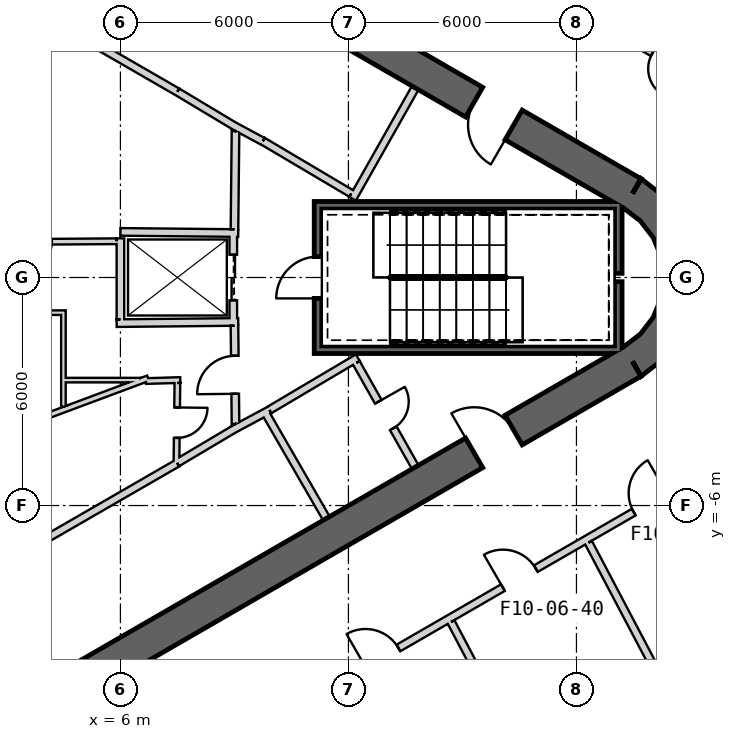
"""IFC4 building model, lengths in metres.
Left out: names, types, materials, properties, quantities, classifications, styles, units other than length and angle.
Written with IfcOpenShell. Run it as: python <this file> out.ifc"""

import sys

from ifc_helpers import new_model, si_unit, direction, frame, frame_2d, origin, place, context, subcontext, project, spatial, polyline, rectangle, outline, extrude, element, fill, save


model = new_model("IFC4")
c1 = context("Model", 3, precision=1e-05, world=origin(), true_north=direction((0.0, 1.0)))
c2 = subcontext(c1, "Body", "Model", "MODEL_VIEW")
j1 = project(units=[si_unit("LENGTHUNIT", "METRE"), si_unit("PLANEANGLEUNIT", "RADIAN")], contexts=[c1])
p1 = place(None, origin())
s1 = spatial("IfcSite", under=j1, at=p1, CompositionType="ELEMENT")
p2 = place(p1, origin())
s2 = spatial("IfcBuilding", under=s1, at=p2, CompositionType="ELEMENT")
p3 = place(p2, frame((0.0, 0.0, 39.5)))
s3 = spatial("IfcBuildingStorey", under=s2, at=p3, CompositionType="ELEMENT", Elevation=39.5)
p4 = place(p3, frame((19.475, 2.208, 0.0), z_axis=(0.0, 0.0, 1.0), x_axis=(-0.866028369851, 0.499994862586, 0.0)))
e1 = element("IfcWall", 1, at=p4, inside=s3, PredefinedType="SHEAR", context=c2, shape_type="SweptSolid", body=[
    extrude(rectangle(XDim=31.523, YDim=0.9, at=frame_2d((15.762, 0.0))), origin(), (0.0, 0.0, 1.0), 6.0),
])
p5 = place(p4, frame((3.612, 0.0, 0.0)))
e2 = element("IfcOpeningElement", 2, at=p5, cuts=e1, PredefinedType="OPENING", context=c2, shape_type="SweptSolid", body=[
    extrude(rectangle(XDim=1.2, YDim=2.4, at=frame_2d((0.6, 1.2))), frame((0.0, 0.46, 0.0), z_axis=(0.0, -1.0, 0.0), x_axis=(1.0, 0.0, 0.0)), (0.0, 0.0, 1.0), 0.92),
])
p6 = place(p4, frame((26.712, 0.0, 0.0)))
e3 = element("IfcOpeningElement", 3, at=p6, cuts=e1, PredefinedType="OPENING", context=c2, shape_type="SweptSolid", body=[
    extrude(rectangle(XDim=1.2, YDim=2.4, at=frame_2d((0.6, 1.2))), frame((0.0, 0.46, 0.0), z_axis=(0.0, -1.0, 0.0), x_axis=(1.0, 0.0, 0.0)), (0.0, 0.0, 1.0), 0.92),
])
p7 = place(p3, frame((-7.825, -17.97, 0.0), z_axis=(0.0, 0.0, 1.0), x_axis=(0.866028369851, 0.499994862586, 0.0)))
e4 = element("IfcWall", 4, at=p7, inside=s3, PredefinedType="SHEAR", context=c2, shape_type="SweptSolid", body=[
    extrude(rectangle(XDim=31.523, YDim=0.9, at=frame_2d((15.762, 0.0))), origin(), (0.0, 0.0, 1.0), 6.0),
])
p8 = place(p7, frame((26.712, 0.0, 0.0)))
e5 = element("IfcOpeningElement", 5, at=p8, cuts=e4, PredefinedType="OPENING", context=c2, shape_type="SweptSolid", body=[
    extrude(rectangle(XDim=1.2, YDim=2.4, at=frame_2d((0.6, 1.2))), frame((0.0, 0.46, 0.0), z_axis=(0.0, -1.0, 0.0), x_axis=(1.0, 0.0, 0.0)), (0.0, 0.0, 1.0), 0.92),
])
p9 = place(p7, frame((3.612, 0.0, 0.0)))
e6 = element("IfcOpeningElement", 6, at=p9, cuts=e4, PredefinedType="OPENING", context=c2, shape_type="SweptSolid", body=[
    extrude(rectangle(XDim=1.2, YDim=2.4, at=frame_2d((0.6, 1.2))), frame((0.0, 0.46, 0.0), z_axis=(0.0, -1.0, 0.0), x_axis=(1.0, 0.0, 0.0)), (0.0, 0.0, 1.0), 0.92),
])
p10 = place(p3, origin())
e7 = element("IfcWall", 7, at=p10, inside=s3, PredefinedType="SHEAR", context=c2, shape_type="SweptSolid", body=[
    extrude(outline(polyline([(19.7, -2.598), (20.321, -2.121), (20.798, -1.5), (21.098, -0.777), (21.2, 0.0), (21.098, 0.777), (20.798, 1.5), (20.321, 2.121), (19.7, 2.598), (19.25, 1.819), (19.685, 1.485), (20.019, 1.05), (20.229, 0.543), (20.3, 0.0), (20.229, -0.543), (20.019, -1.05), (19.685, -1.485), (19.25, -1.819), (19.7, -2.598)])), origin(), (0.0, 0.0, 1.0), 6.0),
])
p11 = place(p3, frame((7.497, 4.886, 0.0), z_axis=(0.0, 0.0, 1.0), x_axis=(-0.866030989016, 0.499990325971, 0.0)))
e8 = element("IfcWall", 8, at=p11, inside=s3, PredefinedType="PLUMBINGWALL", context=c2, shape_type="SweptSolid", body=[
    extrude(rectangle(XDim=8.1, YDim=0.2, at=frame_2d((4.05, 0.0))), origin(), (0.0, 0.0, 1.0), 5.7),
])
p12 = place(p3, frame((12.11, 2.073, 0.0), z_axis=(0.0, 0.0, 1.0), x_axis=(0.49196600604, 0.870614408852, 0.0)))
e9 = element("IfcWall", 9, at=p12, inside=s3, PredefinedType="PLUMBINGWALL", context=c2, shape_type="SweptSolid", body=[
    extrude(rectangle(XDim=3.35, YDim=0.2, at=frame_2d((1.675, 0.0))), origin(), (0.0, 0.0, 1.0), 5.7),
])
p13 = place(p3, frame((12.073, 2.211, 0.0), z_axis=(0.0, 0.0, 1.0), x_axis=(-0.860438357912, 0.509554542943, 0.0)))
e10 = element("IfcWall", 10, at=p13, inside=s3, PredefinedType="PLUMBINGWALL", context=c2, shape_type="SweptSolid", body=[
    extrude(rectangle(XDim=2.7, YDim=0.2, at=frame_2d((1.35, 0.0))), origin(), (0.0, 0.0, 1.0), 5.7),
])
p14 = place(p3, frame((9.748, 3.583, 0.0), z_axis=(0.0, 0.0, 1.0), x_axis=(-0.880917147855, 0.473270513147, 0.0)))
e11 = element("IfcWall", 11, at=p14, inside=s3, PredefinedType="PLUMBINGWALL", context=c2, shape_type="SweptSolid", body=[
    extrude(rectangle(XDim=0.878, YDim=0.2, at=frame_2d((0.439, 0.0))), origin(), (0.0, 0.0, 1.0), 5.7),
])
p15 = place(p3, frame((9.079, 3.937, 0.0), z_axis=(0.0, 0.0, 1.0), x_axis=(-0.857516281273, 0.51445682749, 0.0)))
e12 = element("IfcWall", 12, at=p15, inside=s3, PredefinedType="PLUMBINGWALL", context=c2, shape_type="SweptSolid", body=[
    extrude(rectangle(XDim=1.845, YDim=0.2, at=frame_2d((0.922, 0.0))), origin(), (0.0, 0.0, 1.0), 5.7),
])
p16 = place(p3, frame((0.483, -8.936, 0.0), z_axis=(0.0, 0.0, 1.0), x_axis=(0.866030989016, 0.499990325971, 0.0)))
e13 = element("IfcWall", 13, at=p16, inside=s3, PredefinedType="PLUMBINGWALL", context=c2, shape_type="SweptSolid", body=[
    extrude(rectangle(XDim=8.1, YDim=0.2, at=frame_2d((4.05, 0.0))), origin(), (0.0, 0.0, 1.0), 5.7),
])
p17 = place(p3, frame((9.795, -3.525, 0.0), z_axis=(0.0, 0.0, 1.0), x_axis=(0.499984717929, -0.866034226713, 0.0)))
e14 = element("IfcWall", 14, at=p17, inside=s3, PredefinedType="PLUMBINGWALL", context=c2, shape_type="SweptSolid", body=[
    extrude(rectangle(XDim=3.25, YDim=0.2, at=frame_2d((1.625, 0.0))), origin(), (0.0, 0.0, 1.0), 5.7),
])
p18 = place(p3, frame((8.974, -3.999, 0.0), z_axis=(0.0, 0.0, 1.0), x_axis=(0.880907015104, 0.473289373154, 0.0)))
e15 = element("IfcWall", 15, at=p18, inside=s3, PredefinedType="PLUMBINGWALL", context=c2, shape_type="SweptSolid", body=[
    extrude(rectangle(XDim=1.078, YDim=0.2, at=frame_2d((0.539, 0.0))), origin(), (0.0, 0.0, 1.0), 5.7),
])
p19 = place(p3, frame((7.493, -4.878, 0.0), z_axis=(0.0, 0.0, 1.0), x_axis=(0.859981807212, 0.510324691999, 0.0)))
e16 = element("IfcWall", 16, at=p19, inside=s3, PredefinedType="PLUMBINGWALL", context=c2, shape_type="SweptSolid", body=[
    extrude(rectangle(XDim=1.845, YDim=0.2, at=frame_2d((0.922, 0.0))), origin(), (0.0, 0.0, 1.0), 5.7),
])
p20 = place(p3, frame((19.2, 1.9, -0.35), z_axis=(0.0, 0.0, 1.0), x_axis=(-1.0, 0.0, 0.0)))
e17 = element("IfcWall", 17, at=p20, inside=s3, PredefinedType="SHEAR", context=c2, shape_type="SweptSolid", body=[
    extrude(rectangle(XDim=8.1, YDim=0.2, at=frame_2d((4.05, 0.0))), origin(), (0.0, 0.0, 1.0), 6.05),
])
p21 = place(p3, frame((19.1, -2.0, -0.35), z_axis=(0.0, 0.0, 1.0), x_axis=(0.0, 1.0, 0.0)))
e18 = element("IfcWall", 18, at=p21, inside=s3, PredefinedType="SHEAR", context=c2, shape_type="SweptSolid", body=[
    extrude(rectangle(XDim=1.89, YDim=0.2, at=frame_2d((0.945, 0.0))), origin(), (0.0, 0.0, 1.0), 6.05),
])
p22 = place(p3, frame((19.1, 0.11, -0.35), z_axis=(0.0, 0.0, 1.0), x_axis=(0.0, 1.0, 0.0)))
e19 = element("IfcWall", 19, at=p22, inside=s3, PredefinedType="SHEAR", context=c2, shape_type="SweptSolid", body=[
    extrude(rectangle(XDim=1.69, YDim=0.2, at=frame_2d((0.845, 0.0))), origin(), (0.0, 0.0, 1.0), 6.05),
])
p23 = place(p3, frame((11.1, -1.9, -0.35), z_axis=(0.0, 0.0, 1.0), x_axis=(1.0, 0.0, 0.0)))
e20 = element("IfcWall", 20, at=p23, inside=s3, PredefinedType="SHEAR", context=c2, shape_type="SweptSolid", body=[
    extrude(rectangle(XDim=7.9, YDim=0.2, at=frame_2d((3.95, 0.0))), origin(), (0.0, 0.0, 1.0), 6.05),
])
p24 = place(p3, frame((11.2, -1.8, -0.35), z_axis=(0.0, 0.0, 1.0), x_axis=(0.0, 1.0, 0.0)))
e21 = element("IfcWall", 21, at=p24, inside=s3, PredefinedType="SHEAR", context=c2, shape_type="SweptSolid", body=[
    extrude(rectangle(XDim=3.6, YDim=0.2, at=frame_2d((1.8, 0.0))), origin(), (0.0, 0.0, 1.0), 6.05),
])
p25 = place(p24, frame((1.25, 0.0, 0.35)))
e22 = element("IfcOpeningElement", 22, at=p25, cuts=e21, PredefinedType="OPENING", context=c2, shape_type="SweptSolid", body=[
    extrude(rectangle(XDim=1.1, YDim=2.1, at=frame_2d((0.55, 1.05))), frame((0.0, 0.11, 0.0), z_axis=(0.0, -1.0, 0.0), x_axis=(1.0, 0.0, 0.0)), (0.0, 0.0, 1.0), 0.22),
])
p26 = place(p3, frame((8.97, 1.2, 0.0), z_axis=(0.0, 0.0, 1.0), x_axis=(0.0, -1.0, 0.0)))
e23 = element("IfcWall", 23, at=p26, inside=s3, PredefinedType="PLUMBINGWALL", context=c2, shape_type="SweptSolid", body=[
    extrude(rectangle(XDim=2.4, YDim=0.2, at=frame_2d((1.2, 0.0))), origin(), (0.0, 0.0, 1.0), 5.7),
])
p27 = place(p26, frame((0.6, 0.0, 0.0)))
e24 = element("IfcOpeningElement", 24, at=p27, cuts=e23, PredefinedType="OPENING", context=c2, shape_type="SweptSolid", body=[
    extrude(rectangle(XDim=1.2, YDim=2.4, at=frame_2d((0.6, 1.2))), frame((0.0, 0.11, 0.0), z_axis=(0.0, -1.0, 0.0), x_axis=(1.0, 0.0, 0.0)), (0.0, 0.0, 1.0), 0.22),
])
p28 = place(p3, frame((6.0, 1.2, 0.0), z_axis=(0.0, 0.0, 1.0), x_axis=(0.999949988, -0.010001074852, 0.0)))
e25 = element("IfcWall", 25, at=p28, inside=s3, PredefinedType="PLUMBINGWALL", context=c2, shape_type="SweptSolid", body=[
    extrude(rectangle(XDim=3.1, YDim=0.2, at=frame_2d((1.55, 0.0))), origin(), (0.0, 0.0, 1.0), 5.7),
])
p29 = place(p3, frame((5.9, -1.201, 0.0), z_axis=(0.0, 0.0, 1.0), x_axis=(0.999950064753, 0.009993397809, 0.0)))
e26 = element("IfcWall", 26, at=p29, inside=s3, PredefinedType="PLUMBINGWALL", context=c2, shape_type="SweptSolid", body=[
    extrude(rectangle(XDim=3.2, YDim=0.2, at=frame_2d((1.6, 0.0))), origin(), (0.0, 0.0, 1.0), 5.7),
])
p30 = place(p3, frame((6.0, -1.1, 0.0), z_axis=(0.0, 0.0, 1.0), x_axis=(0.0, 1.0, 0.0)))
e27 = element("IfcWall", 27, at=p30, inside=s3, PredefinedType="PLUMBINGWALL", context=c2, shape_type="SweptSolid", body=[
    extrude(rectangle(XDim=2.13, YDim=0.2, at=frame_2d((1.065, 0.0))), origin(), (0.0, 0.0, 1.0), 5.7),
])
p31 = place(p3, frame((12.245, -2.109, 0.0), z_axis=(0.0, 0.0, 1.0), x_axis=(-0.860414880418, -0.509594185166, 0.0)))
e28 = element("IfcWall", 28, at=p31, inside=s3, PredefinedType="PARTITIONING", context=c2, shape_type="SweptSolid", body=[
    extrude(rectangle(XDim=2.7, YDim=0.2, at=frame_2d((1.35, 0.0))), origin(), (0.0, 0.0, 1.0), 5.7),
])
p32 = place(p3, frame((13.758, -4.99, 0.0), z_axis=(0.0, 0.0, 1.0), x_axis=(-0.491993409184, 0.87059892334, 0.0)))
e29 = element("IfcWall", 29, at=p32, inside=s3, PredefinedType="PARTITIONING", context=c2, shape_type="SweptSolid", body=[
    extrude(rectangle(XDim=3.15, YDim=0.2, at=frame_2d((1.575, 0.0))), origin(), (0.0, 0.0, 1.0), 5.7),
])
p33 = place(p32, frame((1.175, 0.0, 0.0)))
e30 = element("IfcOpeningElement", 30, at=p33, cuts=e29, PredefinedType="OPENING", context=c2, shape_type="SweptSolid", body=[
    extrude(rectangle(XDim=0.8, YDim=2.1, at=frame_2d((0.4, 1.05))), frame((0.0, 0.11, 0.0), z_axis=(0.0, -1.0, 0.0), x_axis=(1.0, 0.0, 0.0)), (0.0, 0.0, 1.0), 0.22),
])
p34 = place(p3, frame((9.001, 1.27, 0.0), z_axis=(0.0, 0.0, 1.0), x_axis=(0.010784614026, 0.999941844359, 0.0)))
e31 = element("IfcWall", 31, at=p34, inside=s3, PredefinedType="PARTITIONING", context=c2, shape_type="SweptSolid", body=[
    extrude(rectangle(XDim=2.581, YDim=0.2, at=frame_2d((1.291, 0.0))), origin(), (0.0, 0.0, 1.0), 5.7),
])
p35 = place(p3, frame((9.029, -3.851, 0.0), z_axis=(0.0, 0.0, 1.0), x_axis=(-0.010783593937, 0.99994185536, 0.0)))
e32 = element("IfcWall", 32, at=p35, inside=s3, PredefinedType="PARTITIONING", context=c2, shape_type="SweptSolid", body=[
    extrude(rectangle(XDim=2.581, YDim=0.2, at=frame_2d((1.291, 0.0))), origin(), (0.0, 0.0, 1.0), 5.7),
])
p36 = place(p35, frame((0.791, 0.0, 0.0)))
e33 = element("IfcOpeningElement", 33, at=p36, cuts=e32, PredefinedType="OPENING", context=c2, shape_type="SweptSolid", body=[
    extrude(rectangle(XDim=1.0, YDim=2.1, at=frame_2d((0.5, 1.05))), frame((0.0, 0.11, 0.0), z_axis=(0.0, -1.0, 0.0), x_axis=(1.0, 0.0, 0.0)), (0.0, 0.0, 1.0), 0.22),
])
p37 = place(p3, frame((1.561, 0.924, 0.0), z_axis=(0.0, 0.0, 1.0), x_axis=(0.999976441218, 0.006864183077, 0.0)))
e34 = element("IfcWall", 34, at=p37, inside=s3, PredefinedType="PLUMBINGWALL", context=c2, shape_type="SweptSolid", body=[
    extrude(rectangle(XDim=4.339, YDim=0.15, at=frame_2d((2.169, 0.0))), origin(), (0.0, 0.0, 1.0), 5.7),
])
p38 = place(p37, frame((1.833, 0.0, 0.0)))
e35 = element("IfcOpeningElement", 35, at=p38, cuts=e34, PredefinedType="OPENING", context=c2, shape_type="SweptSolid", body=[
    extrude(rectangle(XDim=0.8, YDim=2.1, at=frame_2d((0.4, 1.05))), frame((0.0, 0.085, 0.0), z_axis=(0.0, -1.0, 0.0), x_axis=(1.0, 0.0, 0.0)), (0.0, 0.0, 1.0), 0.17),
])
p39 = place(p3, frame((6.729, -2.65, 0.0), z_axis=(0.0, 0.0, 1.0), x_axis=(-0.936914282609, -0.349559189613, 0.0)))
e36 = element("IfcWall", 36, at=p39, inside=s3, PredefinedType="PLUMBINGWALL", context=c2, shape_type="SweptSolid", body=[
    extrude(rectangle(XDim=9.291, YDim=0.15, at=frame_2d((4.645, 0.0))), origin(), (0.0, 0.0, 1.0), 5.7),
])
p40 = place(p3, frame((4.56, -0.925, 0.0), z_axis=(0.0, 0.0, 1.0), x_axis=(-1.0, 0.0, 0.0)))
e37 = element("IfcWall", 37, at=p40, inside=s3, PredefinedType="PARTITIONING", context=c2, shape_type="SweptSolid", body=[
    extrude(rectangle(XDim=2.853, YDim=0.12, at=frame_2d((1.426, 0.0))), origin(), (0.0, 0.0, 1.0), 5.7),
])
p41 = place(p3, frame((4.5, -3.402, 0.0), z_axis=(0.0, 0.0, 1.0), x_axis=(0.0, 1.0, 0.0)))
e38 = element("IfcWall", 38, at=p41, inside=s3, PredefinedType="PARTITIONING", context=c2, shape_type="SweptSolid", body=[
    extrude(rectangle(XDim=2.417, YDim=0.12, at=frame_2d((1.208, 0.0))), origin(), (0.0, 0.0, 1.0), 5.7),
])
p42 = place(p3, frame((6.521, -2.7, 0.0), z_axis=(0.0, 0.0, 1.0), x_axis=(-1.0, 0.0, 0.0)))
e39 = element("IfcWall", 39, at=p42, inside=s3, PredefinedType="PARTITIONING", context=c2, shape_type="SweptSolid", body=[
    extrude(rectangle(XDim=1.961, YDim=0.12, at=frame_2d((0.98, 0.0))), origin(), (0.0, 0.0, 1.0), 5.7),
])
p43 = place(p3, frame((7.575, -2.698, 0.0), z_axis=(0.0, 0.0, 1.0), x_axis=(-0.999552240565, -0.029921871279, 0.0)))
e40 = element("IfcWall", 40, at=p43, inside=s3, PredefinedType="PLUMBINGWALL", context=c2, shape_type="SweptSolid", body=[
    extrude(rectangle(XDim=0.906, YDim=0.15, at=frame_2d((0.453, 0.0))), origin(), (0.0, 0.0, 1.0), 5.7),
])
p44 = place(p3, frame((7.475, -4.865, 0.0), z_axis=(0.0, 0.0, 1.0), x_axis=(0.011682810534, 0.99993175364, 0.0)))
e41 = element("IfcWall", 41, at=p44, inside=s3, PredefinedType="PLUMBINGWALL", context=c2, shape_type="SweptSolid", body=[
    extrude(rectangle(XDim=2.09, YDim=0.15, at=frame_2d((1.045, 0.0))), origin(), (0.0, 0.0, 1.0), 5.7),
])
p45 = place(p44, frame((0.645, 0.0, 0.0)))
e42 = element("IfcOpeningElement", 42, at=p45, cuts=e41, PredefinedType="OPENING", context=c2, shape_type="SweptSolid", body=[
    extrude(rectangle(XDim=0.8, YDim=2.1, at=frame_2d((0.4, 1.05))), frame((0.0, 0.085, 0.0), z_axis=(0.0, -1.0, 0.0), x_axis=(1.0, 0.0, 0.0)), (0.0, 0.0, 1.0), 0.17),
])
p46 = place(p3, frame((21.792, 4.854, 0.0), z_axis=(0.0, 0.0, 1.0), x_axis=(-0.86603554589, 0.499982432947, 0.0)))
e43 = element("IfcWall", 43, at=p46, inside=s3, PredefinedType="PLUMBINGWALL", context=c2, shape_type="SweptSolid", body=[
    extrude(rectangle(XDim=3.197, YDim=0.15, at=frame_2d((1.599, 0.0))), origin(), (0.0, 0.0, 1.0), 4.88),
])
p47 = place(p46, frame((1.275, 0.0, 0.0)))
e44 = element("IfcOpeningElement", 44, at=p47, cuts=e43, PredefinedType="OPENING", context=c2, shape_type="SweptSolid", body=[
    extrude(rectangle(XDim=0.8, YDim=2.1, at=frame_2d((0.4, 1.05))), frame((0.0, 0.085, 0.0), z_axis=(0.0, -1.0, 0.0), x_axis=(1.0, 0.0, 0.0)), (0.0, 0.0, 1.0), 0.17),
])
p48 = place(p3, frame((3.8, -15.242, 0.0), z_axis=(0.0, 0.0, 1.0), x_axis=(0.866025905383, 0.499999131204, 0.0)))
e45 = element("IfcWall", 45, at=p48, inside=s3, PredefinedType="PARTITIONING", context=c2, shape_type="SweptSolid", body=[
    extrude(rectangle(XDim=20.7, YDim=0.2, at=frame_2d((10.35, 0.0))), origin(), (0.0, 0.0, 1.0), 4.88),
])
p49 = place(p48, frame((1.636, 0.0, 0.0)))
e46 = element("IfcOpeningElement", 46, at=p49, cuts=e45, PredefinedType="OPENING", context=c2, shape_type="SweptSolid", body=[
    extrude(rectangle(XDim=1.0, YDim=2.1, at=frame_2d((0.5, 1.05))), frame((0.0, 0.11, 0.0), z_axis=(0.0, -1.0, 0.0), x_axis=(1.0, 0.0, 0.0)), (0.0, 0.0, 1.0), 0.22),
])
p50 = place(p48, frame((5.812, 0.0, 0.0)))
e47 = element("IfcOpeningElement", 47, at=p50, cuts=e45, PredefinedType="OPENING", context=c2, shape_type="SweptSolid", body=[
    extrude(rectangle(XDim=1.0, YDim=2.1, at=frame_2d((0.5, 1.05))), frame((0.0, 0.11, 0.0), z_axis=(0.0, -1.0, 0.0), x_axis=(1.0, 0.0, 0.0)), (0.0, 0.0, 1.0), 0.22),
])
p51 = place(p48, frame((9.987, 0.0, 0.0)))
e48 = element("IfcOpeningElement", 48, at=p51, cuts=e45, PredefinedType="OPENING", context=c2, shape_type="SweptSolid", body=[
    extrude(rectangle(XDim=1.0, YDim=2.1, at=frame_2d((0.5, 1.05))), frame((0.0, 0.11, 0.0), z_axis=(0.0, -1.0, 0.0), x_axis=(1.0, 0.0, 0.0)), (0.0, 0.0, 1.0), 0.22),
])
p52 = place(p48, frame((14.162, 0.0, 0.0)))
e49 = element("IfcOpeningElement", 49, at=p52, cuts=e45, PredefinedType="OPENING", context=c2, shape_type="SweptSolid", body=[
    extrude(rectangle(XDim=1.0, YDim=2.1, at=frame_2d((0.5, 1.05))), frame((0.0, 0.11, 0.0), z_axis=(0.0, -1.0, 0.0), x_axis=(1.0, 0.0, 0.0)), (0.0, 0.0, 1.0), 0.22),
])
p53 = place(p48, frame((18.138, 0.0, 0.0)))
e50 = element("IfcOpeningElement", 50, at=p53, cuts=e45, PredefinedType="OPENING", context=c2, shape_type="SweptSolid", body=[
    extrude(rectangle(XDim=1.0, YDim=2.1, at=frame_2d((0.5, 1.05))), frame((0.0, 0.11, 0.0), z_axis=(0.0, -1.0, 0.0), x_axis=(1.0, 0.0, 0.0)), (0.0, 0.0, 1.0), 0.22),
])
p54 = place(p3, frame((14.701, -9.064, 0.0), z_axis=(0.0, 0.0, 1.0), x_axis=(0.4663926901, -0.884577785512, 0.0)))
e51 = element("IfcWall", 51, at=p54, inside=s3, PredefinedType="PARTITIONING", context=c2, shape_type="SweptSolid", body=[
    extrude(rectangle(XDim=6.958, YDim=0.2, at=frame_2d((3.479, 0.0))), origin(), (0.0, 0.0, 1.0), 5.7),
])
p55 = place(p3, frame((18.317, -6.976, 0.0), z_axis=(0.0, 0.0, 1.0), x_axis=(0.4663926901, -0.884577785512, 0.0)))
e52 = element("IfcWall", 52, at=p55, inside=s3, PredefinedType="PARTITIONING", context=c2, shape_type="SweptSolid", body=[
    extrude(rectangle(XDim=6.958, YDim=0.2, at=frame_2d((3.479, 0.0))), origin(), (0.0, 0.0, 1.0), 4.88),
])
p56 = place(p25, origin())
e53 = element("IfcDoor", 53, at=p56, inside=s3, OperationType="SINGLE_SWING_LEFT", PredefinedType="USERDEFINED", context=c2, shape_type="SweptSolid", body=[
    extrude(rectangle(XDim=1.1, YDim=2.1, at=frame_2d((0.55, 1.05))), frame((0.0, 0.025, 0.0), z_axis=(0.0, -1.0, 0.0), x_axis=(1.0, 0.0, 0.0)), (0.0, 0.0, 1.0), 0.05),
])
fill(e22, e53)
p57 = place(p36, origin())
e54 = element("IfcDoor", 54, at=p57, inside=s3, OperationType="SINGLE_SWING_LEFT", PredefinedType="USERDEFINED", context=c2, shape_type="SweptSolid", body=[
    extrude(rectangle(XDim=1.0, YDim=2.1, at=frame_2d((0.5, 1.05))), frame((0.0, 0.025, 0.0), z_axis=(0.0, -1.0, 0.0), x_axis=(1.0, 0.0, 0.0)), (0.0, 0.0, 1.0), 0.05),
])
fill(e33, e54)
p58 = place(p27, origin())
e55 = element("IfcDoor", 55, at=p58, inside=s3, OperationType="SLIDING_TO_LEFT", PredefinedType="USERDEFINED", context=c2, shape_type="SweptSolid", body=[
    extrude(rectangle(XDim=1.2, YDim=2.4, at=frame_2d((0.6, 1.2))), frame((0.0, 0.025, 0.0), z_axis=(0.0, -1.0, 0.0), x_axis=(1.0, 0.0, 0.0)), (0.0, 0.0, 1.0), 0.05),
])
fill(e24, e55)
p59 = place(p45, origin())
e56 = element("IfcDoor", 56, at=p59, inside=s3, OperationType="SINGLE_SWING_RIGHT", PredefinedType="USERDEFINED", context=c2, shape_type="SweptSolid", body=[
    extrude(rectangle(XDim=0.8, YDim=2.1, at=frame_2d((0.4, 1.05))), frame((0.0, 0.025, 0.0), z_axis=(0.0, -1.0, 0.0), x_axis=(1.0, 0.0, 0.0)), (0.0, 0.0, 1.0), 0.05),
])
fill(e42, e56)
p60 = place(p33, origin())
e57 = element("IfcDoor", 57, at=p60, inside=s3, OperationType="SINGLE_SWING_RIGHT", PredefinedType="USERDEFINED", context=c2, shape_type="SweptSolid", body=[
    extrude(rectangle(XDim=0.8, YDim=2.1, at=frame_2d((0.4, 1.05))), frame((0.0, 0.025, 0.0), z_axis=(0.0, -1.0, 0.0), x_axis=(1.0, 0.0, 0.0)), (0.0, 0.0, 1.0), 0.05),
])
fill(e30, e57)
p61 = place(p47, origin())
e58 = element("IfcDoor", 58, at=p61, inside=s3, OperationType="SINGLE_SWING_LEFT", PredefinedType="USERDEFINED", context=c2, shape_type="SweptSolid", body=[
    extrude(rectangle(XDim=0.8, YDim=2.1, at=frame_2d((0.4, 1.05))), frame((0.0, 0.025, 0.0), z_axis=(0.0, -1.0, 0.0), x_axis=(1.0, 0.0, 0.0)), (0.0, 0.0, 1.0), 0.05),
])
fill(e44, e58)
p62 = place(p51, origin())
e59 = element("IfcDoor", 59, at=p62, inside=s3, OperationType="SINGLE_SWING_LEFT", PredefinedType="USERDEFINED", context=c2, shape_type="SweptSolid", body=[
    extrude(rectangle(XDim=1.0, YDim=2.1, at=frame_2d((0.5, 1.05))), frame((0.0, 0.025, 0.0), z_axis=(0.0, -1.0, 0.0), x_axis=(1.0, 0.0, 0.0)), (0.0, 0.0, 1.0), 0.05),
])
fill(e48, e59)
p63 = place(p52, origin())
e60 = element("IfcDoor", 60, at=p63, inside=s3, OperationType="SINGLE_SWING_LEFT", PredefinedType="USERDEFINED", context=c2, shape_type="SweptSolid", body=[
    extrude(rectangle(XDim=1.0, YDim=2.1, at=frame_2d((0.5, 1.05))), frame((0.0, 0.025, 0.0), z_axis=(0.0, -1.0, 0.0), x_axis=(1.0, 0.0, 0.0)), (0.0, 0.0, 1.0), 0.05),
])
fill(e49, e60)
p64 = place(p53, origin())
e61 = element("IfcDoor", 61, at=p64, inside=s3, OperationType="SINGLE_SWING_RIGHT", PredefinedType="USERDEFINED", context=c2, shape_type="SweptSolid", body=[
    extrude(rectangle(XDim=1.0, YDim=2.1, at=frame_2d((0.5, 1.05))), frame((0.0, 0.025, 0.0), z_axis=(0.0, -1.0, 0.0), x_axis=(1.0, 0.0, 0.0)), (0.0, 0.0, 1.0), 0.05),
])
fill(e50, e61)
p65 = place(p8, origin())
e62 = element("IfcDoor", 62, at=p65, inside=s3, OperationType="SINGLE_SWING_LEFT", PredefinedType="USERDEFINED", context=c2, shape_type="SweptSolid", body=[
    extrude(rectangle(XDim=1.2, YDim=2.4, at=frame_2d((0.6, 1.2))), frame((0.0, 0.025, 0.0), z_axis=(0.0, -1.0, 0.0), x_axis=(1.0, 0.0, 0.0)), (0.0, 0.0, 1.0), 0.05),
])
fill(e5, e62)
p66 = place(p5, origin())
e63 = element("IfcDoor", 63, at=p66, inside=s3, OperationType="SINGLE_SWING_LEFT", PredefinedType="USERDEFINED", context=c2, shape_type="SweptSolid", body=[
    extrude(rectangle(XDim=1.2, YDim=2.4, at=frame_2d((0.6, 1.2))), frame((0.0, 0.025, 0.0), z_axis=(0.0, -1.0, 0.0), x_axis=(1.0, 0.0, 0.0)), (0.0, 0.0, 1.0), 0.05),
])
fill(e2, e63)
save(model, sys.argv[1])
